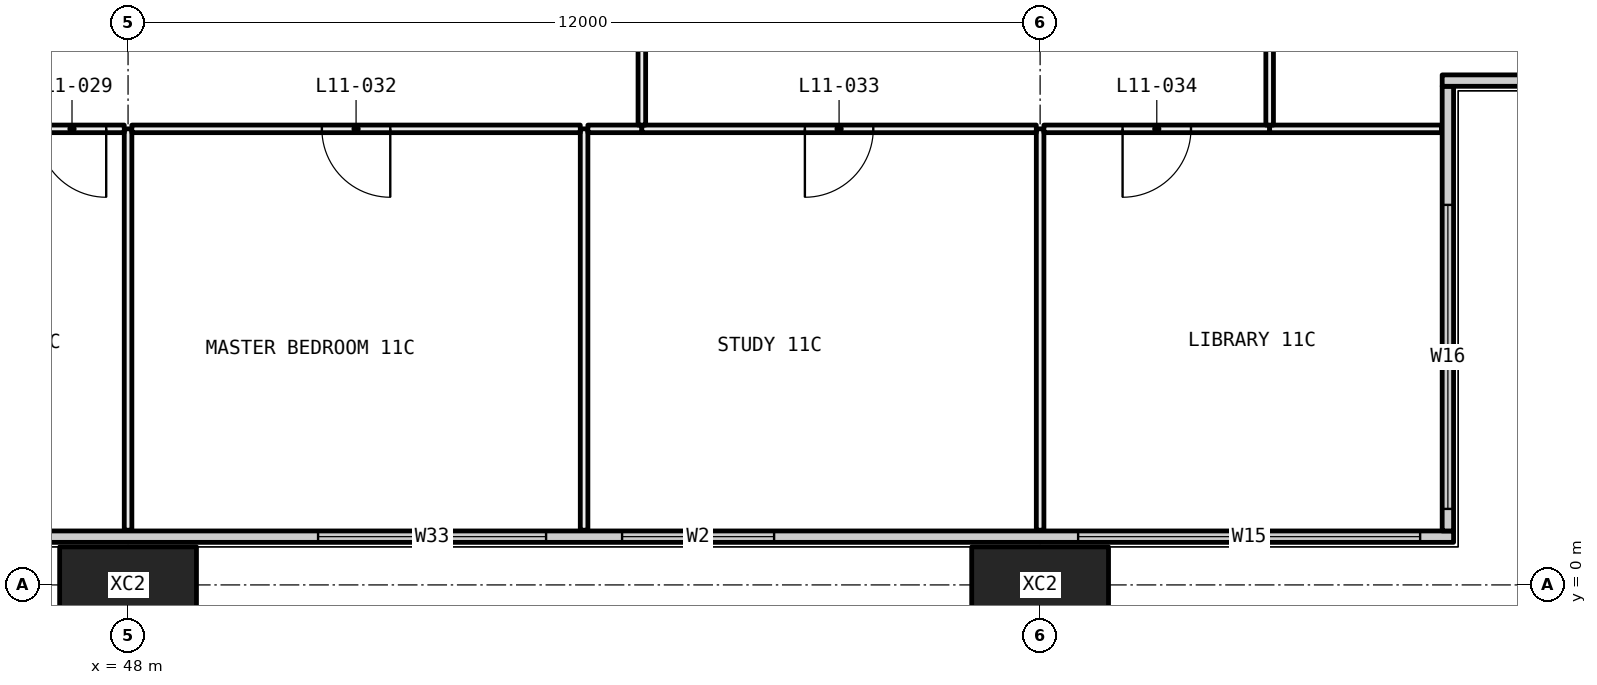
"""IFC4 building model, lengths in metres.
Left out: names, types, materials, properties, quantities, classifications, styles, units other than length and angle.
Written with IfcOpenShell. Run it as: python <this file> out.ifc"""

import sys

from ifc_helpers import new_model, si_unit, direction, frame, frame_2d, origin, origin_2d, place, context, subcontext, project, spatial, rectangle, hollow_rectangle, extrude, element, fill, save


model = new_model("IFC4")
c1 = context("Model", 3, precision=1e-05, world=origin(), true_north=direction((0.0, 1.0)))
c2 = subcontext(c1, "Body", "Model", "MODEL_VIEW")
j1 = project(units=[si_unit("LENGTHUNIT", "METRE"), si_unit("PLANEANGLEUNIT", "RADIAN")], contexts=[c1])
p1 = place(None, origin())
s1 = spatial("IfcSite", under=j1, at=p1, CompositionType="ELEMENT")
p2 = place(p1, origin())
s2 = spatial("IfcBuilding", under=s1, at=p2, CompositionType="ELEMENT")
p3 = place(p2, frame((0.0, 0.0, 50.7)))
s3 = spatial("IfcBuildingStorey", under=s2, at=p3, CompositionType="ELEMENT", Elevation=50.7)
for number, where, z_axis, x_axis in (
    (1, (48.0, 0.0, -0.4), (0.0, 0.0, 1.0), (1.0, 0.0, 0.0)),
    (2, (60.0, 0.0, -0.4), (0.0, 0.0, 1.0), (1.0, 0.0, 0.0)),
):
    element("IfcColumn", number, at=place(p3, frame(where, z_axis=z_axis, x_axis=x_axis)), inside=s3, PredefinedType="COLUMN", context=c2, shape_type="SweptSolid", body=[
        extrude(hollow_rectangle(XDim=1.8, YDim=1.0, WallThickness=0.07, at=origin_2d()), origin(), (0.0, 0.0, 1.0), 3.45),
    ])
p4 = place(p3, frame((6.56, 0.635, 0.0), z_axis=(0.0, 0.0, 1.0), x_axis=(1.0, 0.0, 0.0)))
e3 = element("IfcWall", 3, at=p4, inside=s3, PredefinedType="ELEMENTEDWALL", context=c2, shape_type="SweptSolid", body=[
    extrude(rectangle(XDim=58.88, YDim=0.15, at=frame_2d((29.44, 0.0))), origin(), (0.0, 0.0, 1.0), 3.05),
])
p5 = place(p4, frame((0.44, 0.0, 0.45)))
e4 = element("IfcOpeningElement", 4, at=p5, cuts=e3, PredefinedType="OPENING", context=c2, shape_type="SweptSolid", body=[
    extrude(rectangle(XDim=4.5, YDim=2.55, at=frame_2d((2.25, 1.275))), frame((0.0, 0.085, 0.0), z_axis=(0.0, -1.0, 0.0), x_axis=(1.0, 0.0, 0.0)), (0.0, 0.0, 1.0), 0.17),
])
p6 = place(p4, frame((7.94, 0.0, 0.45)))
e5 = element("IfcOpeningElement", 5, at=p6, cuts=e3, PredefinedType="OPENING", context=c2, shape_type="SweptSolid", body=[
    extrude(rectangle(XDim=3.0, YDim=2.55, at=frame_2d((1.5, 1.275))), frame((0.0, 0.085, 0.0), z_axis=(0.0, -1.0, 0.0), x_axis=(1.0, 0.0, 0.0)), (0.0, 0.0, 1.0), 0.17),
])
p7 = place(p4, frame((11.94, 0.0, 0.45)))
e6 = element("IfcOpeningElement", 6, at=p7, cuts=e3, PredefinedType="OPENING", context=c2, shape_type="SweptSolid", body=[
    extrude(rectangle(XDim=3.0, YDim=2.55, at=frame_2d((1.5, 1.275))), frame((0.0, 0.085, 0.0), z_axis=(0.0, -1.0, 0.0), x_axis=(1.0, 0.0, 0.0)), (0.0, 0.0, 1.0), 0.17),
])
p8 = place(p4, frame((19.94, 0.0, 0.45)))
e7 = element("IfcOpeningElement", 7, at=p8, cuts=e3, PredefinedType="OPENING", context=c2, shape_type="SweptSolid", body=[
    extrude(rectangle(XDim=3.0, YDim=2.55, at=frame_2d((1.5, 1.275))), frame((0.0, 0.085, 0.0), z_axis=(0.0, -1.0, 0.0), x_axis=(1.0, 0.0, 0.0)), (0.0, 0.0, 1.0), 0.17),
])
p9 = place(p4, frame((23.94, 0.0, 0.45)))
e8 = element("IfcOpeningElement", 8, at=p9, cuts=e3, PredefinedType="OPENING", context=c2, shape_type="SweptSolid", body=[
    extrude(rectangle(XDim=2.0, YDim=2.55, at=frame_2d((1.0, 1.275))), frame((0.0, 0.085, 0.0), z_axis=(0.0, -1.0, 0.0), x_axis=(1.0, 0.0, 0.0)), (0.0, 0.0, 1.0), 0.17),
])
p10 = place(p4, frame((31.94, 0.0, 0.45)))
e9 = element("IfcOpeningElement", 9, at=p10, cuts=e3, PredefinedType="OPENING", context=c2, shape_type="SweptSolid", body=[
    extrude(rectangle(XDim=3.0, YDim=2.55, at=frame_2d((1.5, 1.275))), frame((0.0, 0.085, 0.0), z_axis=(0.0, -1.0, 0.0), x_axis=(1.0, 0.0, 0.0)), (0.0, 0.0, 1.0), 0.17),
])
p11 = place(p4, frame((35.94, 0.0, 0.45)))
e10 = element("IfcOpeningElement", 10, at=p11, cuts=e3, PredefinedType="OPENING", context=c2, shape_type="SweptSolid", body=[
    extrude(rectangle(XDim=3.0, YDim=2.55, at=frame_2d((1.5, 1.275))), frame((0.0, 0.085, 0.0), z_axis=(0.0, -1.0, 0.0), x_axis=(1.0, 0.0, 0.0)), (0.0, 0.0, 1.0), 0.17),
])
p12 = place(p4, frame((43.94, 0.0, 0.45)))
e11 = element("IfcOpeningElement", 11, at=p12, cuts=e3, PredefinedType="OPENING", context=c2, shape_type="SweptSolid", body=[
    extrude(rectangle(XDim=3.0, YDim=2.55, at=frame_2d((1.5, 1.275))), frame((0.0, 0.085, 0.0), z_axis=(0.0, -1.0, 0.0), x_axis=(1.0, 0.0, 0.0)), (0.0, 0.0, 1.0), 0.17),
])
p13 = place(p4, frame((47.94, 0.0, 0.45)))
e12 = element("IfcOpeningElement", 12, at=p13, cuts=e3, PredefinedType="OPENING", context=c2, shape_type="SweptSolid", body=[
    extrude(rectangle(XDim=2.0, YDim=2.55, at=frame_2d((1.0, 1.275))), frame((0.0, 0.085, 0.0), z_axis=(0.0, -1.0, 0.0), x_axis=(1.0, 0.0, 0.0)), (0.0, 0.0, 1.0), 0.17),
])
p14 = place(p4, frame((53.94, 0.0, 0.45)))
e13 = element("IfcOpeningElement", 13, at=p14, cuts=e3, PredefinedType="OPENING", context=c2, shape_type="SweptSolid", body=[
    extrude(rectangle(XDim=4.5, YDim=2.55, at=frame_2d((2.25, 1.275))), frame((0.0, 0.085, 0.0), z_axis=(0.0, -1.0, 0.0), x_axis=(1.0, 0.0, 0.0)), (0.0, 0.0, 1.0), 0.17),
])
p15 = place(p3, frame((65.365, 0.71, 0.0), z_axis=(0.0, 0.0, 1.0), x_axis=(0.0, 1.0, 0.0)))
e14 = element("IfcWall", 14, at=p15, inside=s3, PredefinedType="ELEMENTEDWALL", context=c2, shape_type="SweptSolid", body=[
    extrude(rectangle(XDim=5.85, YDim=0.15, at=frame_2d((2.925, 0.0))), origin(), (0.0, 0.0, 1.0), 3.05),
])
p16 = place(p15, frame((0.29, 0.0, 0.45)))
e15 = element("IfcOpeningElement", 15, at=p16, cuts=e14, PredefinedType="OPENING", context=c2, shape_type="SweptSolid", body=[
    extrude(rectangle(XDim=4.0, YDim=2.55, at=frame_2d((2.0, 1.275))), frame((0.0, 0.085, 0.0), z_axis=(0.0, -1.0, 0.0), x_axis=(1.0, 0.0, 0.0)), (0.0, 0.0, 1.0), 0.17),
])
p17 = place(p3, frame((65.29, 6.635, 0.0), z_axis=(0.0, 0.0, 1.0), x_axis=(1.0, 0.0, 0.0)))
e16 = element("IfcWall", 16, at=p17, inside=s3, PredefinedType="ELEMENTEDWALL", context=c2, shape_type="SweptSolid", body=[
    extrude(rectangle(XDim=6.15, YDim=0.15, at=frame_2d((3.075, 0.0))), origin(), (0.0, 0.0, 1.0), 3.05),
])
p18 = place(p17, frame((1.71, 0.0, 0.45)))
e17 = element("IfcOpeningElement", 17, at=p18, cuts=e16, PredefinedType="OPENING", context=c2, shape_type="SweptSolid", body=[
    extrude(rectangle(XDim=4.0, YDim=2.55, at=frame_2d((2.0, 1.275))), frame((0.0, 0.085, 0.0), z_axis=(0.0, -1.0, 0.0), x_axis=(1.0, 0.0, 0.0)), (0.0, 0.0, 1.0), 0.17),
])
p19 = place(p3, frame((48.0, 0.72, 0.0), z_axis=(0.0, 0.0, 1.0), x_axis=(0.0, 1.0, 0.0)))
e18 = element("IfcWall", 18, at=p19, inside=s3, PredefinedType="PARTITIONING", context=c2, shape_type="SweptSolid", body=[
    extrude(rectangle(XDim=5.28, YDim=0.1, at=frame_2d((2.64, 0.0))), origin(), (0.0, 0.0, 1.0), 2.45),
])
p20 = place(p3, frame((47.95, 6.0, 0.0), z_axis=(0.0, 0.0, 1.0), x_axis=(-1.0, 0.0, 0.0)))
e19 = element("IfcWall", 19, at=p20, inside=s3, PredefinedType="PARTITIONING", context=c2, shape_type="SweptSolid", body=[
    extrude(rectangle(XDim=1.375, YDim=0.1, at=frame_2d((0.688, 0.0))), origin(), (0.0, 0.0, 1.0), 2.45),
])
p21 = place(p20, frame((0.238, 0.0, 0.0)))
e20 = element("IfcOpeningElement", 20, at=p21, cuts=e19, PredefinedType="OPENING", context=c2, shape_type="SweptSolid", body=[
    extrude(rectangle(XDim=0.9, YDim=2.1, at=frame_2d((0.45, 1.05))), frame((0.0, 0.06, 0.0), z_axis=(0.0, -1.0, 0.0), x_axis=(1.0, 0.0, 0.0)), (0.0, 0.0, 1.0), 0.12),
])
p22 = place(p3, frame((54.0, 0.72, 0.0), z_axis=(0.0, 0.0, 1.0), x_axis=(0.0, 1.0, 0.0)))
e21 = element("IfcWall", 21, at=p22, inside=s3, PredefinedType="PARTITIONING", context=c2, shape_type="SweptSolid", body=[
    extrude(rectangle(XDim=5.28, YDim=0.1, at=frame_2d((2.64, 0.0))), origin(), (0.0, 0.0, 1.0), 3.05),
])
p23 = place(p3, frame((53.95, 6.0, 0.0), z_axis=(0.0, 0.0, 1.0), x_axis=(-1.0, 0.0, 0.0)))
e22 = element("IfcWall", 22, at=p23, inside=s3, PredefinedType="PARTITIONING", context=c2, shape_type="SweptSolid", body=[
    extrude(rectangle(XDim=5.9, YDim=0.1, at=frame_2d((2.95, 0.0))), origin(), (0.0, 0.0, 1.0), 2.45),
])
p24 = place(p23, frame((2.5, 0.0, 0.0)))
e23 = element("IfcOpeningElement", 23, at=p24, cuts=e22, PredefinedType="OPENING", context=c2, shape_type="SweptSolid", body=[
    extrude(rectangle(XDim=0.9, YDim=2.1, at=frame_2d((0.45, 1.05))), frame((0.0, 0.06, 0.0), z_axis=(0.0, -1.0, 0.0), x_axis=(1.0, 0.0, 0.0)), (0.0, 0.0, 1.0), 0.12),
])
p25 = place(p3, frame((60.0, 0.72, 0.0), z_axis=(0.0, 0.0, 1.0), x_axis=(0.0, 1.0, 0.0)))
e24 = element("IfcWall", 24, at=p25, inside=s3, PredefinedType="PARTITIONING", context=c2, shape_type="SweptSolid", body=[
    extrude(rectangle(XDim=5.28, YDim=0.1, at=frame_2d((2.64, 0.0))), origin(), (0.0, 0.0, 1.0), 2.45),
])
p26 = place(p3, frame((54.76, 6.0, 0.0), z_axis=(0.0, 0.0, 1.0), x_axis=(-1.0, 0.0, 0.0)))
e25 = element("IfcWall", 25, at=p26, inside=s3, PredefinedType="PARTITIONING", context=c2, shape_type="SweptSolid", body=[
    extrude(rectangle(XDim=0.71, YDim=0.1, at=frame_2d((0.355, 0.0))), origin(), (0.0, 0.0, 1.0), 3.05),
])
p27 = place(p3, frame((59.95, 6.0, 0.0), z_axis=(0.0, 0.0, 1.0), x_axis=(-1.0, 0.0, 0.0)))
e26 = element("IfcWall", 26, at=p27, inside=s3, PredefinedType="PARTITIONING", context=c2, shape_type="SweptSolid", body=[
    extrude(rectangle(XDim=5.19, YDim=0.1, at=frame_2d((2.595, 0.0))), origin(), (0.0, 0.0, 1.0), 2.45),
])
p28 = place(p27, frame((2.145, 0.0, 0.0)))
e27 = element("IfcOpeningElement", 27, at=p28, cuts=e26, PredefinedType="OPENING", context=c2, shape_type="SweptSolid", body=[
    extrude(rectangle(XDim=0.9, YDim=2.1, at=frame_2d((0.45, 1.05))), frame((0.0, 0.06, 0.0), z_axis=(0.0, -1.0, 0.0), x_axis=(1.0, 0.0, 0.0)), (0.0, 0.0, 1.0), 0.12),
])
p29 = place(p3, frame((63.02, 6.0, 0.0), z_axis=(0.0, 0.0, 1.0), x_axis=(-1.0, 0.0, 0.0)))
e28 = element("IfcWall", 28, at=p29, inside=s3, PredefinedType="PARTITIONING", context=c2, shape_type="SweptSolid", body=[
    extrude(rectangle(XDim=2.97, YDim=0.1, at=frame_2d((1.485, 0.0))), origin(), (0.0, 0.0, 1.0), 2.45),
])
p30 = place(p29, frame((1.035, 0.0, 0.0)))
e29 = element("IfcOpeningElement", 29, at=p30, cuts=e28, PredefinedType="OPENING", context=c2, shape_type="SweptSolid", body=[
    extrude(rectangle(XDim=0.9, YDim=2.1, at=frame_2d((0.45, 1.05))), frame((0.0, 0.06, 0.0), z_axis=(0.0, -1.0, 0.0), x_axis=(1.0, 0.0, 0.0)), (0.0, 0.0, 1.0), 0.12),
])
p31 = place(p3, frame((65.28, 6.0, 0.0), z_axis=(0.0, 0.0, 1.0), x_axis=(-1.0, 0.0, 0.0)))
e30 = element("IfcWall", 30, at=p31, inside=s3, PredefinedType="PARTITIONING", context=c2, shape_type="SweptSolid", body=[
    extrude(rectangle(XDim=2.26, YDim=0.1, at=frame_2d((1.13, 0.0))), origin(), (0.0, 0.0, 1.0), 3.05),
])
p32 = place(p3, frame((54.76, 6.05, 0.0), z_axis=(0.0, 0.0, 1.0), x_axis=(0.0, 1.0, 0.0)))
e31 = element("IfcWall", 31, at=p32, inside=s3, PredefinedType="PARTITIONING", context=c2, shape_type="SweptSolid", body=[
    extrude(rectangle(XDim=5.95, YDim=0.1, at=frame_2d((2.975, 0.0))), origin(), (0.0, 0.0, 1.0), 2.45),
])
p33 = place(p3, frame((63.02, 6.05, 0.0), z_axis=(0.0, 0.0, 1.0), x_axis=(0.0, 1.0, 0.0)))
e32 = element("IfcWall", 32, at=p33, inside=s3, PredefinedType="PARTITIONING", context=c2, shape_type="SweptSolid", body=[
    extrude(rectangle(XDim=5.95, YDim=0.1, at=frame_2d((2.975, 0.0))), origin(), (0.0, 0.0, 1.0), 2.45),
])
p34 = place(p33, frame((2.525, 0.0, 0.0)))
e33 = element("IfcOpeningElement", 33, at=p34, cuts=e32, PredefinedType="OPENING", context=c2, shape_type="SweptSolid", body=[
    extrude(rectangle(XDim=0.9, YDim=2.1, at=frame_2d((0.45, 1.05))), frame((0.0, 0.06, 0.0), z_axis=(0.0, -1.0, 0.0), x_axis=(1.0, 0.0, 0.0)), (0.0, 0.0, 1.0), 0.12),
])
p35 = place(p12, origin())
e34 = element("IfcWindow", 34, at=p35, inside=s3, PartitioningType="SINGLE_PANEL", PredefinedType="WINDOW", context=c2, shape_type="SweptSolid", body=[
    extrude(rectangle(XDim=3.0, YDim=2.55, at=frame_2d((1.5, 1.275))), frame((0.0, 0.03, 0.0), z_axis=(0.0, -1.0, 0.0), x_axis=(1.0, 0.0, 0.0)), (0.0, 0.0, 1.0), 0.06),
])
fill(e11, e34)
p36 = place(p13, origin())
e35 = element("IfcWindow", 35, at=p36, inside=s3, PartitioningType="SINGLE_PANEL", PredefinedType="WINDOW", context=c2, shape_type="SweptSolid", body=[
    extrude(rectangle(XDim=2.0, YDim=2.55, at=frame_2d((1.0, 1.275))), frame((0.0, 0.03, 0.0), z_axis=(0.0, -1.0, 0.0), x_axis=(1.0, 0.0, 0.0)), (0.0, 0.0, 1.0), 0.06),
])
fill(e12, e35)
p37 = place(p14, origin())
e36 = element("IfcWindow", 36, at=p37, inside=s3, PartitioningType="SINGLE_PANEL", PredefinedType="WINDOW", context=c2, shape_type="SweptSolid", body=[
    extrude(rectangle(XDim=4.5, YDim=2.55, at=frame_2d((2.25, 1.275))), frame((0.0, 0.03, 0.0), z_axis=(0.0, -1.0, 0.0), x_axis=(1.0, 0.0, 0.0)), (0.0, 0.0, 1.0), 0.06),
])
fill(e13, e36)
p38 = place(p16, origin())
e37 = element("IfcWindow", 37, at=p38, inside=s3, PartitioningType="SINGLE_PANEL", PredefinedType="WINDOW", context=c2, shape_type="SweptSolid", body=[
    extrude(rectangle(XDim=4.0, YDim=2.55, at=frame_2d((2.0, 1.275))), frame((0.0, 0.03, 0.0), z_axis=(0.0, -1.0, 0.0), x_axis=(1.0, 0.0, 0.0)), (0.0, 0.0, 1.0), 0.06),
])
fill(e15, e37)
p39 = place(p21, origin())
e38 = element("IfcDoor", 38, at=p39, inside=s3, OperationType="SINGLE_SWING_RIGHT", PredefinedType="DOOR", context=c2, shape_type="SweptSolid", body=[
    extrude(rectangle(XDim=0.9, YDim=2.1, at=frame_2d((0.45, 1.05))), frame((0.0, 0.025, 0.0), z_axis=(0.0, -1.0, 0.0), x_axis=(1.0, 0.0, 0.0)), (0.0, 0.0, 1.0), 0.05),
])
fill(e20, e38)
p40 = place(p24, origin())
e39 = element("IfcDoor", 39, at=p40, inside=s3, OperationType="SINGLE_SWING_RIGHT", PredefinedType="DOOR", context=c2, shape_type="SweptSolid", body=[
    extrude(rectangle(XDim=0.9, YDim=2.1, at=frame_2d((0.45, 1.05))), frame((0.0, 0.025, 0.0), z_axis=(0.0, -1.0, 0.0), x_axis=(1.0, 0.0, 0.0)), (0.0, 0.0, 1.0), 0.05),
])
fill(e23, e39)
p41 = place(p28, origin())
e40 = element("IfcDoor", 40, at=p41, inside=s3, OperationType="SINGLE_SWING_LEFT", PredefinedType="DOOR", context=c2, shape_type="SweptSolid", body=[
    extrude(rectangle(XDim=0.9, YDim=2.1, at=frame_2d((0.45, 1.05))), frame((0.0, 0.025, 0.0), z_axis=(0.0, -1.0, 0.0), x_axis=(1.0, 0.0, 0.0)), (0.0, 0.0, 1.0), 0.05),
])
fill(e27, e40)
p42 = place(p30, origin())
e41 = element("IfcDoor", 41, at=p42, inside=s3, OperationType="SINGLE_SWING_LEFT", PredefinedType="DOOR", context=c2, shape_type="SweptSolid", body=[
    extrude(rectangle(XDim=0.9, YDim=2.1, at=frame_2d((0.45, 1.05))), frame((0.0, 0.025, 0.0), z_axis=(0.0, -1.0, 0.0), x_axis=(1.0, 0.0, 0.0)), (0.0, 0.0, 1.0), 0.05),
])
fill(e29, e41)
save(model, sys.argv[1])
